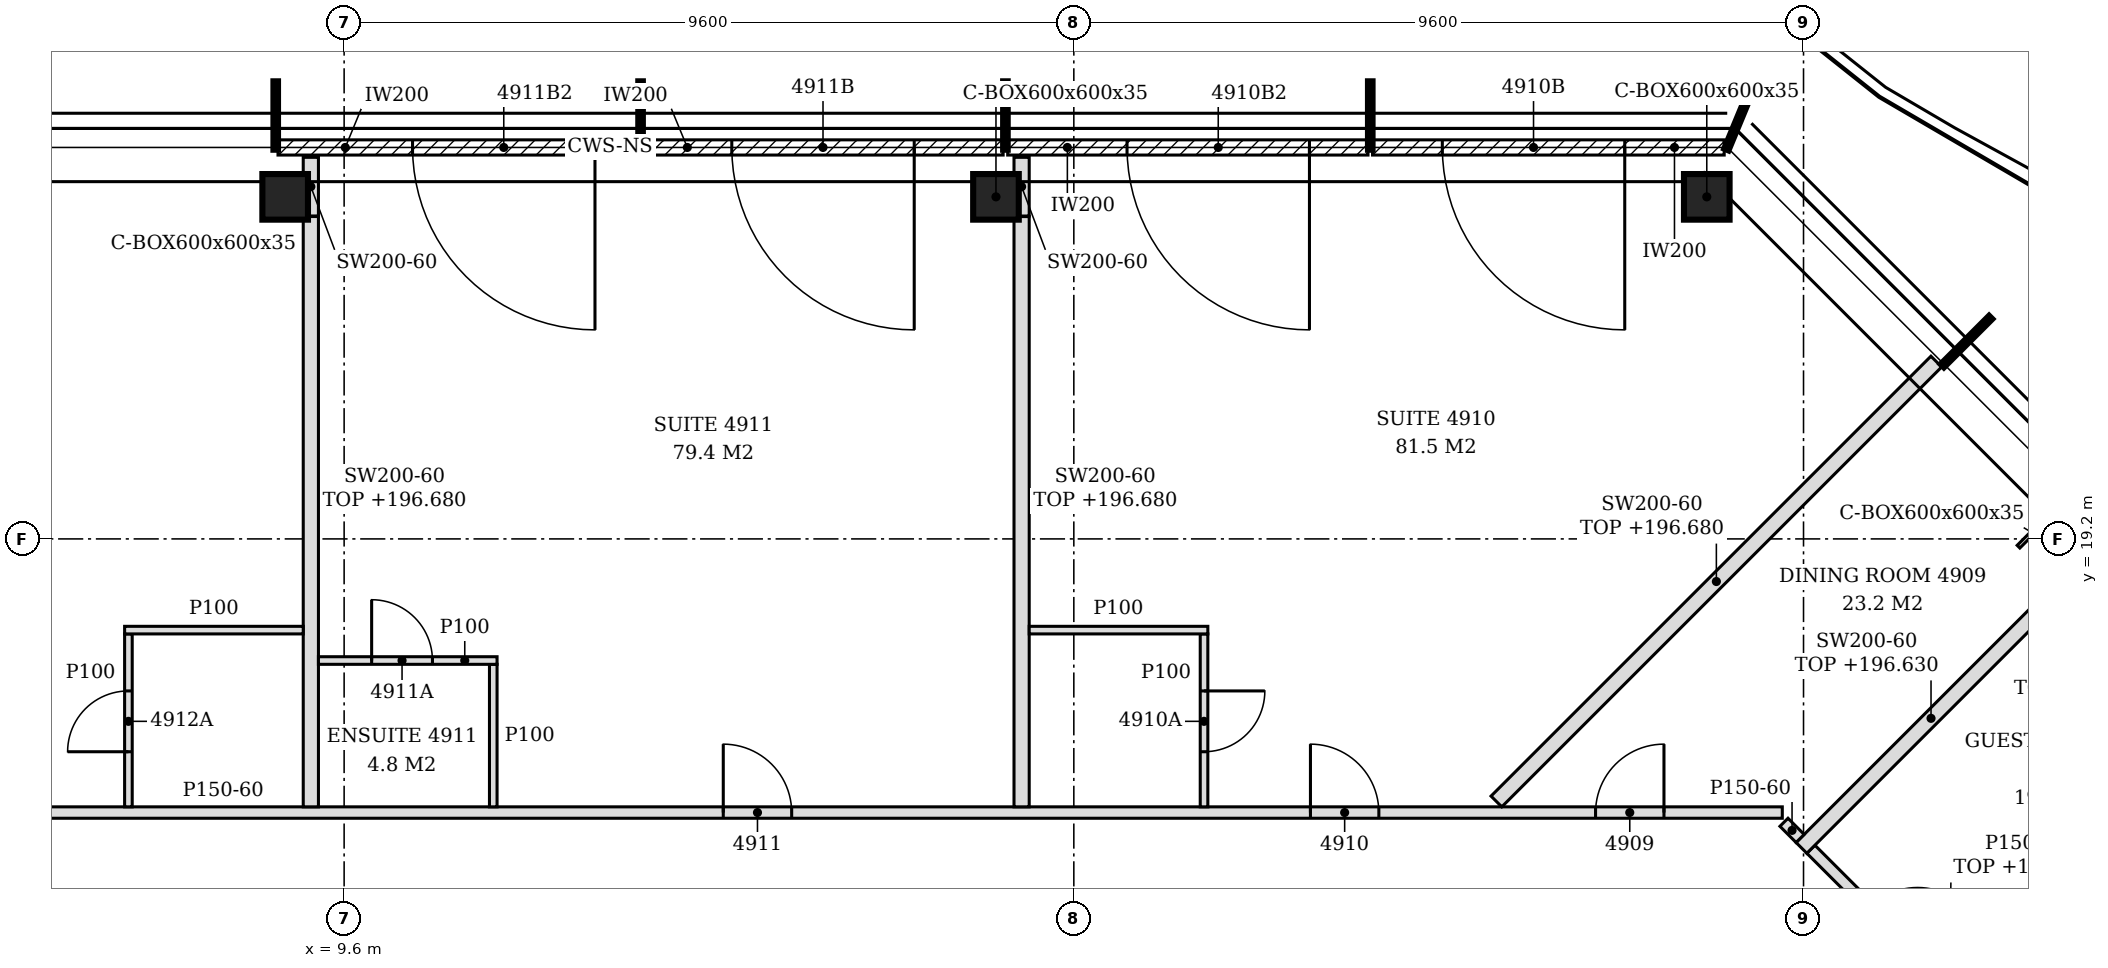
"""IFC4 building model, lengths in metres.
Left out: names, types, materials, properties, quantities, classifications, styles, units other than length and angle.
Written with IfcOpenShell. Run it as: python <this file> out.ifc"""

import sys

from ifc_helpers import new_model, si_unit, direction, frame, frame_2d, origin, origin_2d, place, context, subcontext, project, spatial, polyline, rectangle, hollow_rectangle, outline, extrude, clip, halfspace, element, fill, save


model = new_model("IFC4")
c1 = context("Model", 3, precision=1e-05, world=origin(), true_north=direction((0.0, 1.0)))
c2 = subcontext(c1, "Body", "Model", "MODEL_VIEW")
j1 = project(units=[si_unit("LENGTHUNIT", "METRE"), si_unit("PLANEANGLEUNIT", "RADIAN")], contexts=[c1])
p1 = place(None, origin())
s1 = spatial("IfcSite", under=j1, at=p1, CompositionType="ELEMENT")
p2 = place(p1, origin())
s2 = spatial("IfcBuilding", under=s1, at=p2, CompositionType="ELEMENT")
p3 = place(p2, frame((0.0, 0.0, 193.8)))
s3 = spatial("IfcBuildingStorey", under=s2, at=p3, CompositionType="ELEMENT", Elevation=193.8)
p4 = place(p3, frame((32.152, 19.076, -0.15), z_axis=(0.182857646312, -0.121927149838, 0.975549512489), x_axis=(0.554769659169, 0.83200398152, 0.0)))
e1 = element("IfcColumn", 1, at=p4, inside=s3, PredefinedType="COLUMN", context=c2, shape_type="Clipping", body=[
    clip(clip(extrude(hollow_rectangle(XDim=0.6, YDim=0.6, WallThickness=0.035, at=origin_2d()), origin(), (0.0, 0.0, 1.0), 3.69), halfspace(frame((0.0, 0.0, 0.021), z_axis=(0.0, 0.0, 1.0), x_axis=(1.0, 0.0, 0.0)), True)), halfspace(frame((0.0, 0.0, 3.668), z_axis=(0.0, 0.0, 1.0), x_axis=(1.0, 0.0, 0.0)), False)),
])
p5 = place(p3, frame((27.527, 23.7, -0.15), z_axis=(0.18292158996, -0.12192567461, 0.97553770906), x_axis=(0.55463074681, 0.832096589761, 0.0)))
e2 = element("IfcColumn", 2, at=p5, inside=s3, PredefinedType="COLUMN", context=c2, shape_type="Clipping", body=[
    clip(clip(extrude(hollow_rectangle(XDim=0.6, YDim=0.6, WallThickness=0.035, at=origin_2d()), origin(), (0.0, 0.0, 1.0), 3.69), halfspace(frame((0.0, 0.0, 0.021), z_axis=(0.0, 0.0, 1.0), x_axis=(1.0, 0.0, 0.0)), True)), halfspace(frame((0.0, 0.0, 3.668), z_axis=(0.0, 0.0, 1.0), x_axis=(1.0, 0.0, 0.0)), False)),
])
p6 = place(p3, frame((18.176, 23.7, -0.15), z_axis=(0.182857646312, -0.121927149838, 0.975549512489), x_axis=(0.554769659169, 0.83200398152, 0.0)))
e3 = element("IfcColumn", 3, at=p6, inside=s3, PredefinedType="COLUMN", context=c2, shape_type="Clipping", body=[
    clip(clip(extrude(hollow_rectangle(XDim=0.6, YDim=0.6, WallThickness=0.035, at=origin_2d()), origin(), (0.0, 0.0, 1.0), 3.69), halfspace(frame((0.0, 0.0, 0.021), z_axis=(0.0, 0.0, 1.0), x_axis=(1.0, 0.0, 0.0)), True)), halfspace(frame((0.0, 0.0, 3.668), z_axis=(0.0, 0.0, 1.0), x_axis=(1.0, 0.0, 0.0)), False)),
])
p7 = place(p3, frame((8.824, 23.7, -0.15), z_axis=(0.18292158996, -0.12192567461, 0.97553770906), x_axis=(0.55463074681, 0.832096589761, 0.0)))
e4 = element("IfcColumn", 4, at=p7, inside=s3, PredefinedType="COLUMN", context=c2, shape_type="Clipping", body=[
    clip(clip(extrude(hollow_rectangle(XDim=0.6, YDim=0.6, WallThickness=0.035, at=origin_2d()), origin(), (0.0, 0.0, 1.0), 3.69), halfspace(frame((0.0, 0.0, 0.021), z_axis=(0.0, 0.0, 1.0), x_axis=(1.0, 0.0, 0.0)), True)), halfspace(frame((0.0, 0.0, 3.668), z_axis=(0.0, 0.0, 1.0), x_axis=(1.0, 0.0, 0.0)), False)),
])
p8 = place(p3, frame((27.756, 24.35, 0.0), z_axis=(0.0, 0.0, 1.0), x_axis=(-1.0, 0.0, 0.0)))
e5 = element("IfcWall", 5, at=p8, inside=s3, PredefinedType="NOTDEFINED", context=c2, shape_type="SweptSolid", body=[
    extrude(rectangle(XDim=4.626, YDim=0.2, at=frame_2d((2.313, 0.0))), origin(), (0.0, 0.0, 1.0), 3.45),
])
p9 = place(p8, frame((1.308, 0.0, 0.0)))
e6 = element("IfcOpeningElement", 6, at=p9, cuts=e5, PredefinedType="OPENING", context=c2, shape_type="SweptSolid", body=[
    extrude(rectangle(XDim=2.4, YDim=2.4, at=frame_2d((1.2, 1.2))), frame((0.0, 0.11, 0.0), z_axis=(0.0, -1.0, 0.0), x_axis=(1.0, 0.0, 0.0)), (0.0, 0.0, 1.0), 0.22),
])
p10 = place(p3, frame((23.07, 24.35, 0.0), z_axis=(0.0, 0.0, 1.0), x_axis=(-1.0, 0.0, 0.0)))
e7 = element("IfcWall", 7, at=p10, inside=s3, PredefinedType="NOTDEFINED", context=c2, shape_type="SweptSolid", body=[
    extrude(rectangle(XDim=4.74, YDim=0.2, at=frame_2d((2.37, 0.0))), origin(), (0.0, 0.0, 1.0), 3.45),
])
p11 = place(p10, frame((0.77, 0.0, 0.0)))
e8 = element("IfcOpeningElement", 8, at=p11, cuts=e7, PredefinedType="OPENING", context=c2, shape_type="SweptSolid", body=[
    extrude(rectangle(XDim=2.4, YDim=2.4, at=frame_2d((1.2, 1.2))), frame((0.0, 0.11, 0.0), z_axis=(0.0, -1.0, 0.0), x_axis=(1.0, 0.0, 0.0)), (0.0, 0.0, 1.0), 0.22),
])
p12 = place(p3, frame((18.27, 24.35, 0.0), z_axis=(0.0, 0.0, 1.0), x_axis=(-1.0, 0.0, 0.0)))
e9 = element("IfcWall", 9, at=p12, inside=s3, PredefinedType="NOTDEFINED", context=c2, shape_type="SweptSolid", body=[
    extrude(rectangle(XDim=4.74, YDim=0.2, at=frame_2d((2.37, 0.0))), origin(), (0.0, 0.0, 1.0), 3.45),
])
p13 = place(p12, frame((1.17, 0.0, 0.0)))
e10 = element("IfcOpeningElement", 10, at=p13, cuts=e9, PredefinedType="OPENING", context=c2, shape_type="SweptSolid", body=[
    extrude(rectangle(XDim=2.4, YDim=2.4, at=frame_2d((1.2, 1.2))), frame((0.0, 0.11, 0.0), z_axis=(0.0, -1.0, 0.0), x_axis=(1.0, 0.0, 0.0)), (0.0, 0.0, 1.0), 0.22),
])
p14 = place(p3, frame((13.47, 24.35, 0.0), z_axis=(0.0, 0.0, 1.0), x_axis=(-1.0, 0.0, 0.0)))
e11 = element("IfcWall", 11, at=p14, inside=s3, PredefinedType="NOTDEFINED", context=c2, shape_type="SweptSolid", body=[
    extrude(rectangle(XDim=4.74, YDim=0.2, at=frame_2d((2.37, 0.0))), origin(), (0.0, 0.0, 1.0), 3.45),
])
p15 = place(p14, frame((0.57, 0.0, 0.0)))
e12 = element("IfcOpeningElement", 12, at=p15, cuts=e11, PredefinedType="OPENING", context=c2, shape_type="SweptSolid", body=[
    extrude(rectangle(XDim=2.4, YDim=2.4, at=frame_2d((1.2, 1.2))), frame((0.0, 0.11, 0.0), z_axis=(0.0, -1.0, 0.0), x_axis=(1.0, 0.0, 0.0)), (0.0, 0.0, 1.0), 0.22),
])
p16 = place(p3, frame((31.139, 12.876, 0.0), z_axis=(0.0, 0.0, 1.0), x_axis=(-0.707260784618, 0.706952744207, 0.0)))
e13 = element("IfcWall", 13, at=p16, inside=s3, PredefinedType="PARTITIONING", context=c2, shape_type="SweptSolid", body=[
    extrude(rectangle(XDim=3.17, YDim=0.15, at=frame_2d((1.585, 0.0))), origin(), (0.0, 0.0, 1.0), 2.83),
])
p17 = place(p16, frame((1.185, 0.0, 0.0)))
e14 = element("IfcOpeningElement", 14, at=p17, cuts=e13, PredefinedType="OPENING", context=c2, shape_type="SweptSolid", body=[
    extrude(rectangle(XDim=0.9, YDim=2.1, at=frame_2d((0.45, 1.05))), frame((0.0, 0.085, 0.0), z_axis=(0.0, -1.0, 0.0), x_axis=(1.0, 0.0, 0.0)), (0.0, 0.0, 1.0), 0.17),
])
p18 = place(p3, frame((31.192, 12.929, 0.0), z_axis=(0.0, 0.0, 1.0), x_axis=(0.70701981688, 0.707193734799, 0.0)))
e15 = element("IfcWall", 15, at=p18, inside=s3, PredefinedType="PARTITIONING", context=c2, shape_type="SweptSolid", body=[
    extrude(rectangle(XDim=5.615, YDim=0.2, at=frame_2d((2.808, 0.0))), origin(), (0.0, 0.0, 1.0), 2.63),
])
p19 = place(p3, frame((28.773, 15.135, 0.0), z_axis=(0.0, 0.0, 1.0), x_axis=(0.707106781187, 0.707106781187, 0.0)))
e16 = element("IfcWall", 16, at=p19, inside=s3, PredefinedType="PARTITIONING", context=c2, shape_type="SweptSolid", body=[
    extrude(rectangle(XDim=4.821, YDim=0.2, at=frame_2d((2.411, 0.0))), origin(), (0.0, 0.0, 1.0), 2.83),
])
p20 = place(p3, frame((28.755, 15.259, 0.0), z_axis=(0.0, 0.0, 1.0), x_axis=(-0.706295414481, 0.707917217959, 0.0)))
e17 = element("IfcWall", 17, at=p20, inside=s3, PredefinedType="PARTITIONING", context=c2, shape_type="SweptSolid", body=[
    extrude(rectangle(XDim=0.301, YDim=0.15, at=frame_2d((0.15, 0.0))), origin(), (0.0, 0.0, 1.0), 3.45),
])
p21 = place(p3, frame((-4.875, 15.6, 0.0), z_axis=(0.0, 0.0, 1.0), x_axis=(1.0, 0.0, 0.0)))
e18 = element("IfcWall", 18, at=p21, inside=s3, PredefinedType="PARTITIONING", context=c2, shape_type="SweptSolid", body=[
    extrude(outline(polyline([(0.0, 0.0), (33.396, 0.0), (33.396, 3.45), (24.225, 3.45), (24.223, 2.83), (23.925, 2.83), (23.923, 3.45), (12.225, 3.45), (12.223, 2.83), (11.925, 2.83), (11.923, 3.45), (0.225, 3.45), (0.223, 3.03), (0.0, 3.03), (0.0, 0.0)])), frame((0.0, 0.075, 0.0), z_axis=(0.0, -1.0, 0.0), x_axis=(1.0, 0.0, 0.0)), (0.0, 0.0, 1.0), 0.15),
])
p22 = place(p21, frame((30.939, 0.0, 0.0)))
e19 = element("IfcOpeningElement", 19, at=p22, cuts=e18, PredefinedType="OPENING", context=c2, shape_type="SweptSolid", body=[
    extrude(rectangle(XDim=0.9, YDim=2.1, at=frame_2d((0.45, 1.05))), frame((0.0, 0.085, 0.0), z_axis=(0.0, -1.0, 0.0), x_axis=(1.0, 0.0, 0.0)), (0.0, 0.0, 1.0), 0.17),
])
p23 = place(p21, frame((27.188, 0.0, 0.0)))
e20 = element("IfcOpeningElement", 20, at=p23, cuts=e18, PredefinedType="OPENING", context=c2, shape_type="SweptSolid", body=[
    extrude(rectangle(XDim=0.9, YDim=2.1, at=frame_2d((0.45, 1.05))), frame((0.0, 0.085, 0.0), z_axis=(0.0, -1.0, 0.0), x_axis=(1.0, 0.0, 0.0)), (0.0, 0.0, 1.0), 0.17),
])
p24 = place(p21, frame((19.463, 0.0, 0.0)))
e21 = element("IfcOpeningElement", 21, at=p24, cuts=e18, PredefinedType="OPENING", context=c2, shape_type="SweptSolid", body=[
    extrude(rectangle(XDim=0.9, YDim=2.1, at=frame_2d((0.45, 1.05))), frame((0.0, 0.085, 0.0), z_axis=(0.0, -1.0, 0.0), x_axis=(1.0, 0.0, 0.0)), (0.0, 0.0, 1.0), 0.17),
])
p25 = place(p21, frame((5.406, 0.0, 0.0)))
e22 = element("IfcOpeningElement", 22, at=p25, cuts=e18, PredefinedType="OPENING", context=c2, shape_type="SweptSolid", body=[
    extrude(rectangle(XDim=0.9, YDim=2.1, at=frame_2d((0.45, 1.05))), frame((0.0, 0.085, 0.0), z_axis=(0.0, -1.0, 0.0), x_axis=(1.0, 0.0, 0.0)), (0.0, 0.0, 1.0), 0.17),
])
p26 = place(p3, frame((6.762, 15.675, 0.0), z_axis=(0.0, 0.0, 1.0), x_axis=(0.0, 1.0, 0.0)))
e23 = element("IfcWall", 23, at=p26, inside=s3, PredefinedType="PARTITIONING", context=c2, shape_type="SweptSolid", body=[
    extrude(rectangle(XDim=2.275, YDim=0.1, at=frame_2d((1.137, 0.0))), origin(), (0.0, 0.0, 1.0), 3.45),
])
p27 = place(p26, frame((0.725, 0.0, 0.0)))
e24 = element("IfcOpeningElement", 24, at=p27, cuts=e23, PredefinedType="OPENING", context=c2, shape_type="SweptSolid", body=[
    extrude(rectangle(XDim=0.8, YDim=2.1, at=frame_2d((0.4, 1.05))), frame((0.0, 0.06, 0.0), z_axis=(0.0, -1.0, 0.0), x_axis=(1.0, 0.0, 0.0)), (0.0, 0.0, 1.0), 0.12),
])
p28 = place(p3, frame((9.162, 15.675, 0.0), z_axis=(0.0, 0.0, 1.0), x_axis=(0.0, 1.0, 0.0)))
e25 = element("IfcWall", 25, at=p28, inside=s3, PredefinedType="PARTITIONING", context=c2, shape_type="SweptSolid", body=[
    extrude(outline(polyline([(0.0, 0.0), (7.766, 0.0), (7.478, 0.863), (7.373, 1.725), (7.373, 2.587), (7.373, 2.88), (0.0, 2.88), (0.0, 2.587), (0.0, 1.725), (0.0, 0.863), (0.0, 0.0)])), frame((0.0, 0.1, 0.0), z_axis=(0.0, -1.0, 0.0), x_axis=(1.0, 0.0, 0.0)), (0.0, 0.0, 1.0), 0.2),
])
p29 = place(p3, frame((11.562, 15.675, 0.0), z_axis=(0.0, 0.0, 1.0), x_axis=(0.0, 1.0, 0.0)))
e26 = element("IfcWall", 26, at=p29, inside=s3, PredefinedType="PARTITIONING", context=c2, shape_type="SweptSolid", body=[
    extrude(rectangle(XDim=1.875, YDim=0.1, at=frame_2d((0.938, 0.0))), origin(), (0.0, 0.0, 1.0), 3.45),
])
p30 = place(p3, frame((18.513, 15.675, 0.0), z_axis=(0.0, 0.0, 1.0), x_axis=(0.0, 1.0, 0.0)))
e27 = element("IfcWall", 27, at=p30, inside=s3, PredefinedType="PARTITIONING", context=c2, shape_type="SweptSolid", body=[
    extrude(outline(polyline([(0.0, 0.0), (7.766, 0.0), (7.478, 0.863), (7.373, 1.725), (7.373, 2.587), (7.373, 2.88), (0.0, 2.88), (0.0, 2.587), (0.0, 1.725), (0.0, 0.863), (0.0, 0.0)])), frame((0.0, 0.1, 0.0), z_axis=(0.0, -1.0, 0.0), x_axis=(1.0, 0.0, 0.0)), (0.0, 0.0, 1.0), 0.2),
])
p31 = place(p3, frame((20.913, 15.675, 0.0), z_axis=(0.0, 0.0, 1.0), x_axis=(0.0, 1.0, 0.0)))
e28 = element("IfcWall", 28, at=p31, inside=s3, PredefinedType="PARTITIONING", context=c2, shape_type="SweptSolid", body=[
    extrude(rectangle(XDim=2.275, YDim=0.1, at=frame_2d((1.137, 0.0))), origin(), (0.0, 0.0, 1.0), 3.45),
])
p32 = place(p31, frame((0.725, 0.0, 0.0)))
e29 = element("IfcOpeningElement", 29, at=p32, cuts=e28, PredefinedType="OPENING", context=c2, shape_type="SweptSolid", body=[
    extrude(rectangle(XDim=0.8, YDim=2.1, at=frame_2d((0.4, 1.05))), frame((0.0, 0.06, 0.0), z_axis=(0.0, -1.0, 0.0), x_axis=(1.0, 0.0, 0.0)), (0.0, 0.0, 1.0), 0.12),
])
p33 = place(p3, frame((24.76, 15.746, 0.0), z_axis=(0.0, 0.0, 1.0), x_axis=(0.707106781187, 0.707106781187, 0.0)))
e30 = element("IfcWall", 30, at=p33, inside=s3, PredefinedType="PARTITIONING", context=c2, shape_type="SweptSolid", body=[
    extrude(rectangle(XDim=8.185, YDim=0.2, at=frame_2d((4.092, 0.0))), origin(), (0.0, 0.0, 1.0), 2.88),
])
p34 = place(p3, frame((9.262, 17.6, 0.0), z_axis=(0.0, 0.0, 1.0), x_axis=(1.0, 0.0, 0.0)))
e31 = element("IfcWall", 31, at=p34, inside=s3, PredefinedType="PARTITIONING", context=c2, shape_type="SweptSolid", body=[
    extrude(rectangle(XDim=2.35, YDim=0.1, at=frame_2d((1.175, 0.0))), origin(), (0.0, 0.0, 1.0), 3.45),
])
p35 = place(p34, frame((0.7, 0.0, 0.0)))
e32 = element("IfcOpeningElement", 32, at=p35, cuts=e31, PredefinedType="OPENING", context=c2, shape_type="SweptSolid", body=[
    extrude(rectangle(XDim=0.8, YDim=2.1, at=frame_2d((0.4, 1.05))), frame((0.0, 0.06, 0.0), z_axis=(0.0, -1.0, 0.0), x_axis=(1.0, 0.0, 0.0)), (0.0, 0.0, 1.0), 0.12),
])
p36 = place(p3, frame((6.712, 18.0, 0.0), z_axis=(0.0, 0.0, 1.0), x_axis=(1.0, 0.0, 0.0)))
e33 = element("IfcWall", 33, at=p36, inside=s3, PredefinedType="PARTITIONING", context=c2, shape_type="SweptSolid", body=[
    extrude(outline(polyline([(0.0, 0.0), (2.35, 0.0), (2.35, 3.45), (0.638, 3.45), (0.636, 2.83), (0.338, 2.83), (0.336, 3.45), (0.0, 3.45), (0.0, 0.0)])), frame((0.0, 0.05, 0.0), z_axis=(0.0, -1.0, 0.0), x_axis=(1.0, 0.0, 0.0)), (0.0, 0.0, 1.0), 0.1),
])
p37 = place(p3, frame((18.613, 18.0, 0.0), z_axis=(0.0, 0.0, 1.0), x_axis=(1.0, 0.0, 0.0)))
e34 = element("IfcWall", 34, at=p37, inside=s3, PredefinedType="PARTITIONING", context=c2, shape_type="SweptSolid", body=[
    extrude(outline(polyline([(0.0, 0.0), (2.35, 0.0), (2.35, 3.45), (0.737, 3.45), (0.735, 2.83), (0.437, 2.83), (0.435, 3.45), (0.0, 3.45), (0.0, 0.0)])), frame((0.0, 0.05, 0.0), z_axis=(0.0, -1.0, 0.0), x_axis=(1.0, 0.0, 0.0)), (0.0, 0.0, 1.0), 0.1),
])
p38 = place(p3, frame((9.162, 23.448, 0.0), z_axis=(0.0, 0.0, 1.0), x_axis=(0.0, 1.0, 0.0)))
e35 = element("IfcWall", 35, at=p38, inside=s3, PredefinedType="PARTITIONING", context=c2, shape_type="SweptSolid", body=[
    extrude(outline(polyline([(0.454, 0.0), (0.771, 0.0), (0.771, 0.863), (0.771, 1.725), (0.771, 2.587), (0.771, 3.45), (0.0, 3.45), (0.33, 2.587), (0.438, 1.725), (0.454, 0.863), (0.454, 0.0)])), frame((0.0, 0.1, 0.0), z_axis=(0.0, -1.0, 0.0), x_axis=(1.0, 0.0, 0.0)), (0.0, 0.0, 1.0), 0.2),
])
p39 = place(p3, frame((18.513, 23.448, 0.0), z_axis=(0.0, 0.0, 1.0), x_axis=(0.0, 1.0, 0.0)))
e36 = element("IfcWall", 36, at=p39, inside=s3, PredefinedType="PARTITIONING", context=c2, shape_type="SweptSolid", body=[
    extrude(outline(polyline([(0.455, 0.0), (0.772, 0.0), (0.772, 0.863), (0.772, 1.725), (0.772, 2.587), (0.772, 3.45), (0.0, 3.45), (0.33, 2.587), (0.438, 1.725), (0.455, 0.863), (0.455, 0.0)])), frame((0.0, 0.1, 0.0), z_axis=(0.0, -1.0, 0.0), x_axis=(1.0, 0.0, 0.0)), (0.0, 0.0, 1.0), 0.2),
])
p40 = place(p3, frame((31.628, 19.098, 0.0), z_axis=(0.0, 0.0, 1.0), x_axis=(0.707106781187, 0.707106781187, 0.0)))
e37 = element("IfcWall", 37, at=p40, inside=s3, PredefinedType="PARTITIONING", context=c2, shape_type="SweptSolid", body=[
    extrude(rectangle(XDim=0.868, YDim=0.05, at=frame_2d((0.434, 0.0))), origin(), (0.0, 0.0, 1.0), 2.93),
])
p41 = place(p9, origin())
e38 = element("IfcDoor", 38, at=p41, inside=s3, OperationType="SINGLE_SWING_LEFT", PredefinedType="DOOR", context=c2, shape_type="SweptSolid", body=[
    extrude(rectangle(XDim=2.4, YDim=2.4, at=frame_2d((1.2, 1.2))), frame((0.0, 0.025, 0.0), z_axis=(0.0, -1.0, 0.0), x_axis=(1.0, 0.0, 0.0)), (0.0, 0.0, 1.0), 0.05),
])
fill(e6, e38)
p42 = place(p11, origin())
e39 = element("IfcDoor", 39, at=p42, inside=s3, OperationType="SINGLE_SWING_LEFT", PredefinedType="DOOR", context=c2, shape_type="SweptSolid", body=[
    extrude(rectangle(XDim=2.4, YDim=2.4, at=frame_2d((1.2, 1.2))), frame((0.0, 0.025, 0.0), z_axis=(0.0, -1.0, 0.0), x_axis=(1.0, 0.0, 0.0)), (0.0, 0.0, 1.0), 0.05),
])
fill(e8, e39)
p43 = place(p13, origin())
e40 = element("IfcDoor", 40, at=p43, inside=s3, OperationType="SINGLE_SWING_LEFT", PredefinedType="DOOR", context=c2, shape_type="SweptSolid", body=[
    extrude(rectangle(XDim=2.4, YDim=2.4, at=frame_2d((1.2, 1.2))), frame((0.0, 0.025, 0.0), z_axis=(0.0, -1.0, 0.0), x_axis=(1.0, 0.0, 0.0)), (0.0, 0.0, 1.0), 0.05),
])
fill(e10, e40)
p44 = place(p15, origin())
e41 = element("IfcDoor", 41, at=p44, inside=s3, OperationType="SINGLE_SWING_LEFT", PredefinedType="DOOR", context=c2, shape_type="SweptSolid", body=[
    extrude(rectangle(XDim=2.4, YDim=2.4, at=frame_2d((1.2, 1.2))), frame((0.0, 0.025, 0.0), z_axis=(0.0, -1.0, 0.0), x_axis=(1.0, 0.0, 0.0)), (0.0, 0.0, 1.0), 0.05),
])
fill(e12, e41)
p45 = place(p22, origin())
e42 = element("IfcDoor", 42, at=p45, inside=s3, OperationType="SINGLE_SWING_RIGHT", PredefinedType="DOOR", context=c2, shape_type="SweptSolid", body=[
    extrude(rectangle(XDim=0.9, YDim=2.1, at=frame_2d((0.45, 1.05))), frame((0.0, 0.025, 0.0), z_axis=(0.0, -1.0, 0.0), x_axis=(1.0, 0.0, 0.0)), (0.0, 0.0, 1.0), 0.05),
])
fill(e19, e42)
p46 = place(p23, origin())
e43 = element("IfcDoor", 43, at=p46, inside=s3, OperationType="SINGLE_SWING_LEFT", PredefinedType="DOOR", context=c2, shape_type="SweptSolid", body=[
    extrude(rectangle(XDim=0.9, YDim=2.1, at=frame_2d((0.45, 1.05))), frame((0.0, 0.025, 0.0), z_axis=(0.0, -1.0, 0.0), x_axis=(1.0, 0.0, 0.0)), (0.0, 0.0, 1.0), 0.05),
])
fill(e20, e43)
p47 = place(p32, frame((0.8, 0.0, 0.0), z_axis=(0.0, 0.0, 1.0), x_axis=(-1.0, 0.0, 0.0)))
e44 = element("IfcDoor", 44, at=p47, inside=s3, OperationType="SINGLE_SWING_LEFT", PredefinedType="DOOR", context=c2, shape_type="SweptSolid", body=[
    extrude(rectangle(XDim=0.8, YDim=2.1, at=frame_2d((0.4, 1.05))), frame((0.0, 0.025, 0.0), z_axis=(0.0, -1.0, 0.0), x_axis=(1.0, 0.0, 0.0)), (0.0, 0.0, 1.0), 0.05),
])
fill(e29, e44)
p48 = place(p24, origin())
e45 = element("IfcDoor", 45, at=p48, inside=s3, OperationType="SINGLE_SWING_LEFT", PredefinedType="DOOR", context=c2, shape_type="SweptSolid", body=[
    extrude(rectangle(XDim=0.9, YDim=2.1, at=frame_2d((0.45, 1.05))), frame((0.0, 0.025, 0.0), z_axis=(0.0, -1.0, 0.0), x_axis=(1.0, 0.0, 0.0)), (0.0, 0.0, 1.0), 0.05),
])
fill(e21, e45)
p49 = place(p35, origin())
e46 = element("IfcDoor", 46, at=p49, inside=s3, OperationType="SINGLE_SWING_LEFT", PredefinedType="DOOR", context=c2, shape_type="SweptSolid", body=[
    extrude(rectangle(XDim=0.8, YDim=2.1, at=frame_2d((0.4, 1.05))), frame((0.0, 0.025, 0.0), z_axis=(0.0, -1.0, 0.0), x_axis=(1.0, 0.0, 0.0)), (0.0, 0.0, 1.0), 0.05),
])
fill(e32, e46)
p50 = place(p27, origin())
e47 = element("IfcDoor", 47, at=p50, inside=s3, OperationType="SINGLE_SWING_LEFT", PredefinedType="DOOR", context=c2, shape_type="SweptSolid", body=[
    extrude(rectangle(XDim=0.8, YDim=2.1, at=frame_2d((0.4, 1.05))), frame((0.0, 0.025, 0.0), z_axis=(0.0, -1.0, 0.0), x_axis=(1.0, 0.0, 0.0)), (0.0, 0.0, 1.0), 0.05),
])
fill(e24, e47)
save(model, sys.argv[1])
